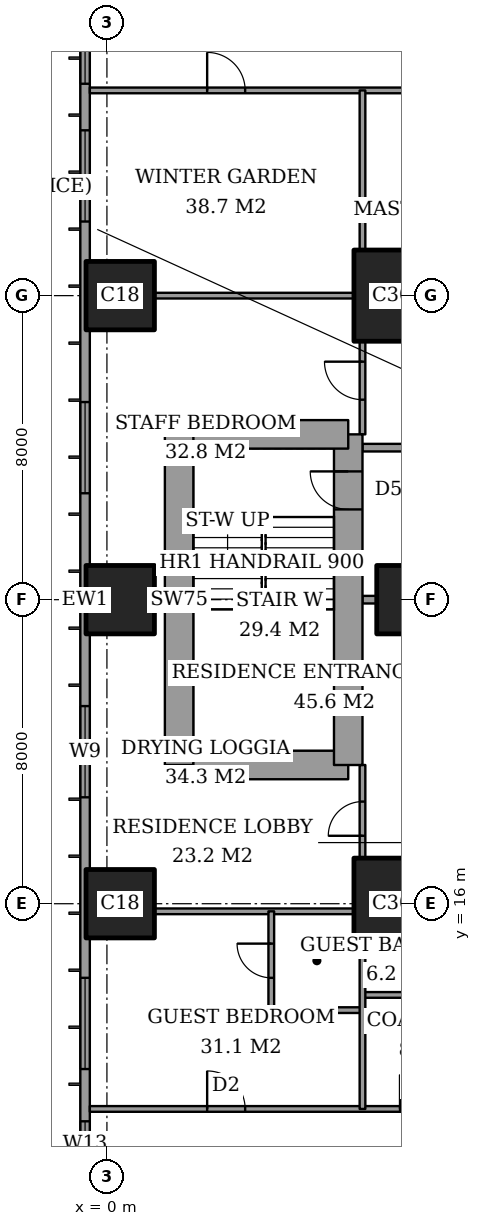
"""IFC4 building model, lengths in metres.
Left out: names, types, materials, properties, quantities, classifications, styles, units other than length and angle.
Written with IfcOpenShell. Run it as: python <this file> out.ifc"""

import sys

from ifc_helpers import new_model, si_unit, direction, frame, frame_2d, origin, origin_2d, place, context, subcontext, project, spatial, rectangle, extrude, element, fill, save


model = new_model("IFC4")
c1 = context("Model", 3, precision=1e-05, world=origin(), true_north=direction((0.0, 1.0)))
c2 = subcontext(c1, "Body", "Model", "MODEL_VIEW")
j1 = project(units=[si_unit("LENGTHUNIT", "METRE"), si_unit("PLANEANGLEUNIT", "RADIAN")], contexts=[c1])
p1 = place(None, origin())
s1 = spatial("IfcSite", under=j1, at=p1, CompositionType="ELEMENT")
p2 = place(p1, origin())
s2 = spatial("IfcBuilding", under=s1, at=p2, CompositionType="ELEMENT")
p3 = place(p2, frame((0.0, 0.0, 185.8)))
s3 = spatial("IfcBuildingStorey", under=s2, at=p3, CompositionType="ELEMENT", Elevation=185.8)
for number, where, z_axis, x_axis in (
    (1, (0.35, 16.0, 0.0), (0.0, 0.0, 1.0), (1.0, 0.0, 0.0)),
    (2, (0.35, 24.0, 0.0), (0.0, 0.0, 1.0), (1.0, 0.0, 0.0)),
    (3, (0.35, 32.0, 0.0), (0.0, 0.0, 1.0), (1.0, 0.0, 0.0)),
):
    element("IfcColumn", number, at=place(p3, frame(where, z_axis=z_axis, x_axis=x_axis)), inside=s3, PredefinedType="COLUMN", context=c2, shape_type="SweptSolid", body=[
        extrude(rectangle(XDim=1.8, YDim=1.8, at=origin_2d()), origin(), (0.0, 0.0, 1.0), 3.6),
    ])
p4 = place(p3, frame((8.0, 16.0, 0.0), z_axis=(0.0, 0.0, 1.0), x_axis=(1.0, 0.0, 0.0)))
e4 = element("IfcColumn", 4, at=p4, inside=s3, PredefinedType="COLUMN", context=c2, shape_type="SweptSolid", body=[
    extrude(rectangle(XDim=3.0, YDim=2.4, at=origin_2d()), origin(), (0.0, 0.0, 1.0), 3.6),
])
p5 = place(p3, frame((8.0, 24.0, 0.0), z_axis=(0.0, 0.0, 1.0), x_axis=(1.0, 0.0, 0.0)))
e5 = element("IfcColumn", 5, at=p5, inside=s3, PredefinedType="COLUMN", context=c2, shape_type="SweptSolid", body=[
    extrude(rectangle(XDim=1.8, YDim=1.8, at=origin_2d()), origin(), (0.0, 0.0, 1.0), 3.6),
])
p6 = place(p3, frame((8.0, 32.0, 0.0), z_axis=(0.0, 0.0, 1.0), x_axis=(1.0, 0.0, 0.0)))
e6 = element("IfcColumn", 6, at=p6, inside=s3, PredefinedType="COLUMN", context=c2, shape_type="SweptSolid", body=[
    extrude(rectangle(XDim=3.0, YDim=2.4, at=origin_2d()), origin(), (0.0, 0.0, 1.0), 3.6),
])
p7 = place(p3, frame((1.9, 19.65, 0.0), z_axis=(0.0, 0.0, 1.0), x_axis=(1.0, 0.0, 0.0)))
e7 = element("IfcWall", 7, at=p7, inside=s3, PredefinedType="SHEAR", context=c2, shape_type="SweptSolid", body=[
    extrude(rectangle(XDim=4.45, YDim=0.75, at=frame_2d((2.225, 0.0))), origin(), (0.0, 0.0, 1.0), 3.6),
])
p8 = place(p3, frame((6.35, 19.65, 0.0), z_axis=(0.0, 0.0, 1.0), x_axis=(0.0, 1.0, 0.0)))
e8 = element("IfcWall", 8, at=p8, inside=s3, PredefinedType="SHEAR", context=c2, shape_type="SweptSolid", body=[
    extrude(rectangle(XDim=8.7, YDim=0.75, at=frame_2d((4.35, 0.0))), origin(), (0.0, 0.0, 1.0), 3.6),
])
p9 = place(p8, frame((6.725, 0.0, 0.0)))
e9 = element("IfcOpeningElement", 9, at=p9, cuts=e8, PredefinedType="OPENING", context=c2, shape_type="SweptSolid", body=[
    extrude(rectangle(XDim=1.0, YDim=2.1, at=frame_2d((0.5, 1.05))), frame((0.0, 0.385, 0.0), z_axis=(0.0, -1.0, 0.0), x_axis=(1.0, 0.0, 0.0)), (0.0, 0.0, 1.0), 0.77),
])
p10 = place(p3, frame((6.35, 28.35, 0.0), z_axis=(0.0, 0.0, 1.0), x_axis=(-1.0, 0.0, 0.0)))
e10 = element("IfcWall", 10, at=p10, inside=s3, PredefinedType="SHEAR", context=c2, shape_type="SweptSolid", body=[
    extrude(rectangle(XDim=4.45, YDim=0.75, at=frame_2d((2.225, 0.0))), origin(), (0.0, 0.0, 1.0), 3.6),
])
p11 = place(p3, frame((1.9, 28.35, 0.0), z_axis=(0.0, 0.0, 1.0), x_axis=(0.0, -1.0, 0.0)))
e11 = element("IfcWall", 11, at=p11, inside=s3, PredefinedType="SHEAR", context=c2, shape_type="SweptSolid", body=[
    extrude(rectangle(XDim=8.7, YDim=0.75, at=frame_2d((4.35, 0.0))), origin(), (0.0, 0.0, 1.0), 3.6),
])
p12 = place(p3, frame((-0.575, 44.825, 0.0), z_axis=(0.0, 0.0, 1.0), x_axis=(0.0, -1.0, 0.0)))
e12 = element("IfcWall", 12, at=p12, inside=s3, PredefinedType="SOLIDWALL", context=c2, shape_type="SweptSolid", body=[
    extrude(rectangle(XDim=41.65, YDim=0.25, at=frame_2d((20.825, 0.0))), origin(), (0.0, 0.0, 1.0), 3.6),
])
p13 = place(p12, frame((0.825, 0.0, 0.2)))
e13 = element("IfcOpeningElement", 13, at=p13, cuts=e12, PredefinedType="OPENING", context=c2, shape_type="SweptSolid", body=[
    extrude(rectangle(XDim=2.4, YDim=2.4, at=frame_2d((1.2, 1.2))), frame((0.0, 0.135, 0.0), z_axis=(0.0, -1.0, 0.0), x_axis=(1.0, 0.0, 0.0)), (0.0, 0.0, 1.0), 0.27),
])
p14 = place(p12, frame((6.05, 0.0, 0.2)))
e14 = element("IfcOpeningElement", 14, at=p14, cuts=e12, PredefinedType="OPENING", context=c2, shape_type="SweptSolid", body=[
    extrude(rectangle(XDim=1.2, YDim=2.4, at=frame_2d((0.6, 1.2))), frame((0.0, 0.135, 0.0), z_axis=(0.0, -1.0, 0.0), x_axis=(1.0, 0.0, 0.0)), (0.0, 0.0, 1.0), 0.27),
])
p15 = place(p12, frame((8.475, 0.0, 0.2)))
e15 = element("IfcOpeningElement", 15, at=p15, cuts=e12, PredefinedType="OPENING", context=c2, shape_type="SweptSolid", body=[
    extrude(rectangle(XDim=2.4, YDim=2.4, at=frame_2d((1.2, 1.2))), frame((0.0, 0.135, 0.0), z_axis=(0.0, -1.0, 0.0), x_axis=(1.0, 0.0, 0.0)), (0.0, 0.0, 1.0), 0.27),
])
p16 = place(p12, frame((15.625, 0.0, 0.2)))
e16 = element("IfcOpeningElement", 16, at=p16, cuts=e12, PredefinedType="OPENING", context=c2, shape_type="SweptSolid", body=[
    extrude(rectangle(XDim=2.4, YDim=2.4, at=frame_2d((1.2, 1.2))), frame((0.0, 0.135, 0.0), z_axis=(0.0, -1.0, 0.0), x_axis=(1.0, 0.0, 0.0)), (0.0, 0.0, 1.0), 0.27),
])
p17 = place(p12, frame((23.625, 0.0, 0.2)))
e17 = element("IfcOpeningElement", 17, at=p17, cuts=e12, PredefinedType="OPENING", context=c2, shape_type="SweptSolid", body=[
    extrude(rectangle(XDim=2.4, YDim=2.4, at=frame_2d((1.2, 1.2))), frame((0.0, 0.135, 0.0), z_axis=(0.0, -1.0, 0.0), x_axis=(1.0, 0.0, 0.0)), (0.0, 0.0, 1.0), 0.27),
])
p18 = place(p12, frame((30.775, 0.0, 0.2)))
e18 = element("IfcOpeningElement", 18, at=p18, cuts=e12, PredefinedType="OPENING", context=c2, shape_type="SweptSolid", body=[
    extrude(rectangle(XDim=2.4, YDim=2.4, at=frame_2d((1.2, 1.2))), frame((0.0, 0.135, 0.0), z_axis=(0.0, -1.0, 0.0), x_axis=(1.0, 0.0, 0.0)), (0.0, 0.0, 1.0), 0.27),
])
p19 = place(p12, frame((34.55, 0.0, 0.2)))
e19 = element("IfcOpeningElement", 19, at=p19, cuts=e12, PredefinedType="OPENING", context=c2, shape_type="SweptSolid", body=[
    extrude(rectangle(XDim=1.2, YDim=2.4, at=frame_2d((0.6, 1.2))), frame((0.0, 0.135, 0.0), z_axis=(0.0, -1.0, 0.0), x_axis=(1.0, 0.0, 0.0)), (0.0, 0.0, 1.0), 0.27),
])
p20 = place(p12, frame((38.425, 0.0, 0.2)))
e20 = element("IfcOpeningElement", 20, at=p20, cuts=e12, PredefinedType="OPENING", context=c2, shape_type="SweptSolid", body=[
    extrude(rectangle(XDim=2.4, YDim=2.4, at=frame_2d((1.2, 1.2))), frame((0.0, 0.135, 0.0), z_axis=(0.0, -1.0, 0.0), x_axis=(1.0, 0.0, 0.0)), (0.0, 0.0, 1.0), 0.27),
])
p21 = place(p3, frame((-0.45, 10.6, 0.0), z_axis=(0.0, 0.0, 1.0), x_axis=(1.0, 0.0, 0.0)))
e21 = element("IfcWall", 21, at=p21, inside=s3, PredefinedType="PARTITIONING", context=c2, shape_type="SweptSolid", body=[
    extrude(rectangle(XDim=25.011, YDim=0.15, at=frame_2d((12.505, 0.0))), origin(), (0.0, 0.0, 1.0), 3.35),
])
p22 = place(p21, frame((10.65, 0.0, 0.0)))
e22 = element("IfcOpeningElement", 22, at=p22, cuts=e21, PredefinedType="OPENING", context=c2, shape_type="SweptSolid", body=[
    extrude(rectangle(XDim=1.0, YDim=2.1, at=frame_2d((0.5, 1.05))), frame((0.0, 0.085, 0.0), z_axis=(0.0, -1.0, 0.0), x_axis=(1.0, 0.0, 0.0)), (0.0, 0.0, 1.0), 0.17),
])
p23 = place(p21, frame((3.087, 0.0, 0.0)))
e23 = element("IfcOpeningElement", 23, at=p23, cuts=e21, PredefinedType="OPENING", context=c2, shape_type="SweptSolid", body=[
    extrude(rectangle(XDim=1.0, YDim=2.1, at=frame_2d((0.5, 1.05))), frame((0.0, 0.085, 0.0), z_axis=(0.0, -1.0, 0.0), x_axis=(1.0, 0.0, 0.0)), (0.0, 0.0, 1.0), 0.17),
])
p24 = place(p21, frame((8.163, 0.0, 0.0)))
e24 = element("IfcOpeningElement", 24, at=p24, cuts=e21, PredefinedType="OPENING", context=c2, shape_type="SweptSolid", body=[
    extrude(rectangle(XDim=0.9, YDim=2.1, at=frame_2d((0.45, 1.05))), frame((0.0, 0.085, 0.0), z_axis=(0.0, -1.0, 0.0), x_axis=(1.0, 0.0, 0.0)), (0.0, 0.0, 1.0), 0.17),
])
p25 = place(p21, frame((13.35, 0.0, 0.0)))
e25 = element("IfcOpeningElement", 25, at=p25, cuts=e21, PredefinedType="OPENING", context=c2, shape_type="SweptSolid", body=[
    extrude(rectangle(XDim=1.0, YDim=2.1, at=frame_2d((0.5, 1.05))), frame((0.0, 0.085, 0.0), z_axis=(0.0, -1.0, 0.0), x_axis=(1.0, 0.0, 0.0)), (0.0, 0.0, 1.0), 0.17),
])
p26 = place(p21, frame((16.5, 0.0, 0.0)))
e26 = element("IfcOpeningElement", 26, at=p26, cuts=e21, PredefinedType="OPENING", context=c2, shape_type="SweptSolid", body=[
    extrude(rectangle(XDim=0.9, YDim=2.1, at=frame_2d((0.45, 1.05))), frame((0.0, 0.085, 0.0), z_axis=(0.0, -1.0, 0.0), x_axis=(1.0, 0.0, 0.0)), (0.0, 0.0, 1.0), 0.17),
])
p27 = place(p21, frame((21.175, 0.0, 0.0)))
e27 = element("IfcOpeningElement", 27, at=p27, cuts=e21, PredefinedType="OPENING", context=c2, shape_type="SweptSolid", body=[
    extrude(rectangle(XDim=1.0, YDim=2.1, at=frame_2d((0.5, 1.05))), frame((0.0, 0.085, 0.0), z_axis=(0.0, -1.0, 0.0), x_axis=(1.0, 0.0, 0.0)), (0.0, 0.0, 1.0), 0.17),
])
p28 = place(p3, frame((4.325, 13.2, 0.0), z_axis=(0.0, 0.0, 1.0), x_axis=(1.0, 0.0, 0.0)))
e28 = element("IfcWall", 28, at=p28, inside=s3, PredefinedType="PARTITIONING", context=c2, shape_type="SweptSolid", body=[
    extrude(rectangle(XDim=2.4, YDim=0.15, at=frame_2d((1.2, 0.0))), origin(), (0.0, 0.0, 1.0), 3.35),
])
p29 = place(p3, frame((6.725, 13.6, 0.0), z_axis=(0.0, 0.0, 1.0), x_axis=(1.0, 0.0, 0.0)))
e29 = element("IfcWall", 29, at=p29, inside=s3, PredefinedType="PARTITIONING", context=c2, shape_type="SweptSolid", body=[
    extrude(rectangle(XDim=2.875, YDim=0.15, at=frame_2d((1.438, 0.0))), origin(), (0.0, 0.0, 1.0), 3.35),
])
p30 = place(p3, frame((1.25, 15.8, 0.0), z_axis=(0.0, 0.0, 1.0), x_axis=(1.0, 0.0, 0.0)))
e30 = element("IfcWall", 30, at=p30, inside=s3, PredefinedType="PARTITIONING", context=c2, shape_type="SweptSolid", body=[
    extrude(rectangle(XDim=5.25, YDim=0.15, at=frame_2d((2.625, 0.0))), origin(), (0.0, 0.0, 1.0), 3.35),
])
p31 = place(p3, frame((6.725, 24.0, 0.0), z_axis=(0.0, 0.0, 1.0), x_axis=(1.0, 0.0, 0.0)))
e31 = element("IfcWall", 31, at=p31, inside=s3, PredefinedType="PARTITIONING", context=c2, shape_type="SweptSolid", body=[
    extrude(rectangle(XDim=0.375, YDim=0.2, at=frame_2d((0.188, 0.0))), origin(), (0.0, 0.0, 1.0), 3.35),
])
p32 = place(p3, frame((6.725, 28.0, 0.0), z_axis=(0.0, 0.0, 1.0), x_axis=(1.0, 0.0, 0.0)))
e32 = element("IfcWall", 32, at=p32, inside=s3, PredefinedType="PARTITIONING", context=c2, shape_type="SweptSolid", body=[
    extrude(rectangle(XDim=17.275, YDim=0.2, at=frame_2d((8.637, 0.0))), origin(), (0.0, 0.0, 1.0), 3.35),
])
p33 = place(p32, frame((6.675, 0.0, 0.0)))
e33 = element("IfcOpeningElement", 33, at=p33, cuts=e32, PredefinedType="OPENING", context=c2, shape_type="SweptSolid", body=[
    extrude(rectangle(XDim=1.2, YDim=2.4, at=frame_2d((0.6, 1.2))), frame((0.0, 0.11, 0.0), z_axis=(0.0, -1.0, 0.0), x_axis=(1.0, 0.0, 0.0)), (0.0, 0.0, 1.0), 0.22),
])
p34 = place(p3, frame((1.25, 32.0, 0.0), z_axis=(0.0, 0.0, 1.0), x_axis=(1.0, 0.0, 0.0)))
e34 = element("IfcWall", 34, at=p34, inside=s3, PredefinedType="PARTITIONING", context=c2, shape_type="SweptSolid", body=[
    extrude(rectangle(XDim=5.25, YDim=0.15, at=frame_2d((2.625, 0.0))), origin(), (0.0, 0.0, 1.0), 2.634),
])
p35 = place(p3, frame((-0.45, 37.4, 0.0), z_axis=(0.0, 0.0, 1.0), x_axis=(1.0, 0.0, 0.0)))
e35 = element("IfcWall", 35, at=p35, inside=s3, PredefinedType="PARTITIONING", context=c2, shape_type="SweptSolid", body=[
    extrude(rectangle(XDim=25.011, YDim=0.15, at=frame_2d((12.505, 0.0))), origin(), (0.0, 0.0, 1.0), 3.35),
])
p36 = place(p35, frame((13.25, 0.0, 0.0)))
e36 = element("IfcOpeningElement", 36, at=p36, cuts=e35, PredefinedType="OPENING", context=c2, shape_type="SweptSolid", body=[
    extrude(rectangle(XDim=1.0, YDim=2.1, at=frame_2d((0.5, 1.05))), frame((0.0, 0.085, 0.0), z_axis=(0.0, -1.0, 0.0), x_axis=(1.0, 0.0, 0.0)), (0.0, 0.0, 1.0), 0.17),
])
p37 = place(p35, frame((3.087, 0.0, 0.0)))
e37 = element("IfcOpeningElement", 37, at=p37, cuts=e35, PredefinedType="OPENING", context=c2, shape_type="SweptSolid", body=[
    extrude(rectangle(XDim=1.0, YDim=2.1, at=frame_2d((0.5, 1.05))), frame((0.0, 0.085, 0.0), z_axis=(0.0, -1.0, 0.0), x_axis=(1.0, 0.0, 0.0)), (0.0, 0.0, 1.0), 0.17),
])
p38 = place(p35, frame((8.363, 0.0, 0.0)))
e38 = element("IfcOpeningElement", 38, at=p38, cuts=e35, PredefinedType="OPENING", context=c2, shape_type="SweptSolid", body=[
    extrude(rectangle(XDim=0.9, YDim=2.1, at=frame_2d((0.45, 1.05))), frame((0.0, 0.085, 0.0), z_axis=(0.0, -1.0, 0.0), x_axis=(1.0, 0.0, 0.0)), (0.0, 0.0, 1.0), 0.17),
])
p39 = place(p35, frame((11.05, 0.0, 0.0)))
e39 = element("IfcOpeningElement", 39, at=p39, cuts=e35, PredefinedType="OPENING", context=c2, shape_type="SweptSolid", body=[
    extrude(rectangle(XDim=1.0, YDim=2.1, at=frame_2d((0.5, 1.05))), frame((0.0, 0.085, 0.0), z_axis=(0.0, -1.0, 0.0), x_axis=(1.0, 0.0, 0.0)), (0.0, 0.0, 1.0), 0.17),
])
p40 = place(p35, frame((16.15, 0.0, 0.0)))
e40 = element("IfcOpeningElement", 40, at=p40, cuts=e35, PredefinedType="OPENING", context=c2, shape_type="SweptSolid", body=[
    extrude(rectangle(XDim=1.0, YDim=2.1, at=frame_2d((0.5, 1.05))), frame((0.0, 0.085, 0.0), z_axis=(0.0, -1.0, 0.0), x_axis=(1.0, 0.0, 0.0)), (0.0, 0.0, 1.0), 0.17),
])
p41 = place(p35, frame((21.175, 0.0, 0.0)))
e41 = element("IfcOpeningElement", 41, at=p41, cuts=e35, PredefinedType="OPENING", context=c2, shape_type="SweptSolid", body=[
    extrude(rectangle(XDim=1.0, YDim=2.1, at=frame_2d((0.5, 1.05))), frame((0.0, 0.085, 0.0), z_axis=(0.0, -1.0, 0.0), x_axis=(1.0, 0.0, 0.0)), (0.0, 0.0, 1.0), 0.17),
])
p42 = place(p3, frame((4.325, 13.2, 0.0), z_axis=(0.0, 0.0, 1.0), x_axis=(0.0, 1.0, 0.0)))
e42 = element("IfcWall", 42, at=p42, inside=s3, PredefinedType="PARTITIONING", context=c2, shape_type="SweptSolid", body=[
    extrude(rectangle(XDim=2.6, YDim=0.15, at=frame_2d((1.3, 0.0))), origin(), (0.0, 0.0, 1.0), 3.35),
])
p43 = place(p42, frame((0.85, 0.0, 0.0)))
e43 = element("IfcOpeningElement", 43, at=p43, cuts=e42, PredefinedType="OPENING", context=c2, shape_type="SweptSolid", body=[
    extrude(rectangle(XDim=0.9, YDim=2.1, at=frame_2d((0.45, 1.05))), frame((0.0, 0.085, 0.0), z_axis=(0.0, -1.0, 0.0), x_axis=(1.0, 0.0, 0.0)), (0.0, 0.0, 1.0), 0.17),
])
p44 = place(p3, frame((6.725, 10.6, 0.0), z_axis=(0.0, 0.0, 1.0), x_axis=(0.0, 1.0, 0.0)))
e44 = element("IfcWall", 44, at=p44, inside=s3, PredefinedType="PARTITIONING", context=c2, shape_type="SweptSolid", body=[
    extrude(rectangle(XDim=4.2, YDim=0.15, at=frame_2d((2.1, 0.0))), origin(), (0.0, 0.0, 1.0), 3.35),
])
p45 = place(p3, frame((6.725, 17.2, 0.0), z_axis=(0.0, 0.0, 1.0), x_axis=(0.0, 1.0, 0.0)))
e45 = element("IfcWall", 45, at=p45, inside=s3, PredefinedType="PARTITIONING", context=c2, shape_type="SweptSolid", body=[
    extrude(rectangle(XDim=2.45, YDim=0.15, at=frame_2d((1.225, 0.0))), origin(), (0.0, 0.0, 1.0), 3.35),
])
p46 = place(p45, frame((0.587, 0.0, 0.0)))
e46 = element("IfcOpeningElement", 46, at=p46, cuts=e45, PredefinedType="OPENING", context=c2, shape_type="SweptSolid", body=[
    extrude(rectangle(XDim=0.9, YDim=2.1, at=frame_2d((0.45, 1.05))), frame((0.0, 0.085, 0.0), z_axis=(0.0, -1.0, 0.0), x_axis=(1.0, 0.0, 0.0)), (0.0, 0.0, 1.0), 0.17),
])
p47 = place(p3, frame((6.725, 28.35, 0.0), z_axis=(0.0, 0.0, 1.0), x_axis=(0.0, 1.0, 0.0)))
e47 = element("IfcWall", 47, at=p47, inside=s3, PredefinedType="PARTITIONING", context=c2, shape_type="SweptSolid", body=[
    extrude(rectangle(XDim=2.45, YDim=0.15, at=frame_2d((1.225, 0.0))), origin(), (0.0, 0.0, 1.0), 3.35),
])
p48 = place(p47, frame((0.913, 0.0, 0.0)))
e48 = element("IfcOpeningElement", 48, at=p48, cuts=e47, PredefinedType="OPENING", context=c2, shape_type="SweptSolid", body=[
    extrude(rectangle(XDim=1.0, YDim=2.1, at=frame_2d((0.5, 1.05))), frame((0.0, 0.085, 0.0), z_axis=(0.0, -1.0, 0.0), x_axis=(1.0, 0.0, 0.0)), (0.0, 0.0, 1.0), 0.17),
])
p49 = place(p3, frame((6.725, 33.2, 0.0), z_axis=(0.0, 0.0, 1.0), x_axis=(0.0, 1.0, 0.0)))
e49 = element("IfcWall", 49, at=p49, inside=s3, PredefinedType="PARTITIONING", context=c2, shape_type="SweptSolid", body=[
    extrude(rectangle(XDim=4.2, YDim=0.15, at=frame_2d((2.1, 0.0))), origin(), (0.0, 0.0, 1.0), 3.35),
])
p50 = place(p14, origin())
e50 = element("IfcWindow", 50, at=p50, inside=s3, PartitioningType="SINGLE_PANEL", PredefinedType="WINDOW", context=c2, shape_type="SweptSolid", body=[
    extrude(rectangle(XDim=1.2, YDim=2.4, at=frame_2d((0.6, 1.2))), frame((0.0, 0.03, 0.0), z_axis=(0.0, -1.0, 0.0), x_axis=(1.0, 0.0, 0.0)), (0.0, 0.0, 1.0), 0.06),
])
fill(e14, e50)
p51 = place(p15, origin())
e51 = element("IfcWindow", 51, at=p51, inside=s3, PartitioningType="SINGLE_PANEL", PredefinedType="WINDOW", context=c2, shape_type="SweptSolid", body=[
    extrude(rectangle(XDim=2.4, YDim=2.4, at=frame_2d((1.2, 1.2))), frame((0.0, 0.03, 0.0), z_axis=(0.0, -1.0, 0.0), x_axis=(1.0, 0.0, 0.0)), (0.0, 0.0, 1.0), 0.06),
])
fill(e15, e51)
p52 = place(p16, origin())
e52 = element("IfcWindow", 52, at=p52, inside=s3, PartitioningType="SINGLE_PANEL", PredefinedType="WINDOW", context=c2, shape_type="SweptSolid", body=[
    extrude(rectangle(XDim=2.4, YDim=2.4, at=frame_2d((1.2, 1.2))), frame((0.0, 0.03, 0.0), z_axis=(0.0, -1.0, 0.0), x_axis=(1.0, 0.0, 0.0)), (0.0, 0.0, 1.0), 0.06),
])
fill(e16, e52)
p53 = place(p17, origin())
e53 = element("IfcWindow", 53, at=p53, inside=s3, PartitioningType="SINGLE_PANEL", PredefinedType="WINDOW", context=c2, shape_type="SweptSolid", body=[
    extrude(rectangle(XDim=2.4, YDim=2.4, at=frame_2d((1.2, 1.2))), frame((0.0, 0.03, 0.0), z_axis=(0.0, -1.0, 0.0), x_axis=(1.0, 0.0, 0.0)), (0.0, 0.0, 1.0), 0.06),
])
fill(e17, e53)
p54 = place(p18, origin())
e54 = element("IfcWindow", 54, at=p54, inside=s3, PartitioningType="SINGLE_PANEL", PredefinedType="WINDOW", context=c2, shape_type="SweptSolid", body=[
    extrude(rectangle(XDim=2.4, YDim=2.4, at=frame_2d((1.2, 1.2))), frame((0.0, 0.03, 0.0), z_axis=(0.0, -1.0, 0.0), x_axis=(1.0, 0.0, 0.0)), (0.0, 0.0, 1.0), 0.06),
])
fill(e18, e54)
p55 = place(p19, origin())
e55 = element("IfcWindow", 55, at=p55, inside=s3, PartitioningType="SINGLE_PANEL", PredefinedType="WINDOW", context=c2, shape_type="SweptSolid", body=[
    extrude(rectangle(XDim=1.2, YDim=2.4, at=frame_2d((0.6, 1.2))), frame((0.0, 0.03, 0.0), z_axis=(0.0, -1.0, 0.0), x_axis=(1.0, 0.0, 0.0)), (0.0, 0.0, 1.0), 0.06),
])
fill(e19, e55)
p56 = place(p43, origin())
e56 = element("IfcDoor", 56, at=p56, inside=s3, OperationType="SINGLE_SWING_LEFT", PredefinedType="DOOR", context=c2, shape_type="SweptSolid", body=[
    extrude(rectangle(XDim=0.9, YDim=2.1, at=frame_2d((0.45, 1.05))), frame((0.0, 0.025, 0.0), z_axis=(0.0, -1.0, 0.0), x_axis=(1.0, 0.0, 0.0)), (0.0, 0.0, 1.0), 0.05),
])
fill(e43, e56)
p57 = place(p23, origin())
e57 = element("IfcDoor", 57, at=p57, inside=s3, OperationType="SINGLE_SWING_RIGHT", PredefinedType="DOOR", context=c2, shape_type="SweptSolid", body=[
    extrude(rectangle(XDim=1.0, YDim=2.1, at=frame_2d((0.5, 1.05))), frame((0.0, 0.025, 0.0), z_axis=(0.0, -1.0, 0.0), x_axis=(1.0, 0.0, 0.0)), (0.0, 0.0, 1.0), 0.05),
])
fill(e23, e57)
p58 = place(p46, origin())
e58 = element("IfcDoor", 58, at=p58, inside=s3, OperationType="SINGLE_SWING_RIGHT", PredefinedType="DOOR", context=c2, shape_type="SweptSolid", body=[
    extrude(rectangle(XDim=0.9, YDim=2.1, at=frame_2d((0.45, 1.05))), frame((0.0, 0.025, 0.0), z_axis=(0.0, -1.0, 0.0), x_axis=(1.0, 0.0, 0.0)), (0.0, 0.0, 1.0), 0.05),
])
fill(e46, e58)
p59 = place(p24, origin())
e59 = element("IfcDoor", 59, at=p59, inside=s3, OperationType="SINGLE_SWING_RIGHT", PredefinedType="DOOR", context=c2, shape_type="SweptSolid", body=[
    extrude(rectangle(XDim=0.9, YDim=2.1, at=frame_2d((0.45, 1.05))), frame((0.0, 0.025, 0.0), z_axis=(0.0, -1.0, 0.0), x_axis=(1.0, 0.0, 0.0)), (0.0, 0.0, 1.0), 0.05),
])
fill(e24, e59)
p60 = place(p37, origin())
e60 = element("IfcDoor", 60, at=p60, inside=s3, OperationType="SINGLE_SWING_RIGHT", PredefinedType="DOOR", context=c2, shape_type="SweptSolid", body=[
    extrude(rectangle(XDim=1.0, YDim=2.1, at=frame_2d((0.5, 1.05))), frame((0.0, 0.025, 0.0), z_axis=(0.0, -1.0, 0.0), x_axis=(1.0, 0.0, 0.0)), (0.0, 0.0, 1.0), 0.05),
])
fill(e37, e60)
p61 = place(p48, origin())
e61 = element("IfcDoor", 61, at=p61, inside=s3, OperationType="SINGLE_SWING_LEFT", PredefinedType="DOOR", context=c2, shape_type="SweptSolid", body=[
    extrude(rectangle(XDim=1.0, YDim=2.1, at=frame_2d((0.5, 1.05))), frame((0.0, 0.025, 0.0), z_axis=(0.0, -1.0, 0.0), x_axis=(1.0, 0.0, 0.0)), (0.0, 0.0, 1.0), 0.05),
])
fill(e48, e61)
p62 = place(p9, origin())
e62 = element("IfcDoor", 62, at=p62, inside=s3, OperationType="SINGLE_SWING_LEFT", PredefinedType="DOOR", context=c2, shape_type="SweptSolid", body=[
    extrude(rectangle(XDim=1.0, YDim=2.1, at=frame_2d((0.5, 1.05))), frame((0.0, 0.025, 0.0), z_axis=(0.0, -1.0, 0.0), x_axis=(1.0, 0.0, 0.0)), (0.0, 0.0, 1.0), 0.05),
])
fill(e9, e62)
save(model, sys.argv[1])
